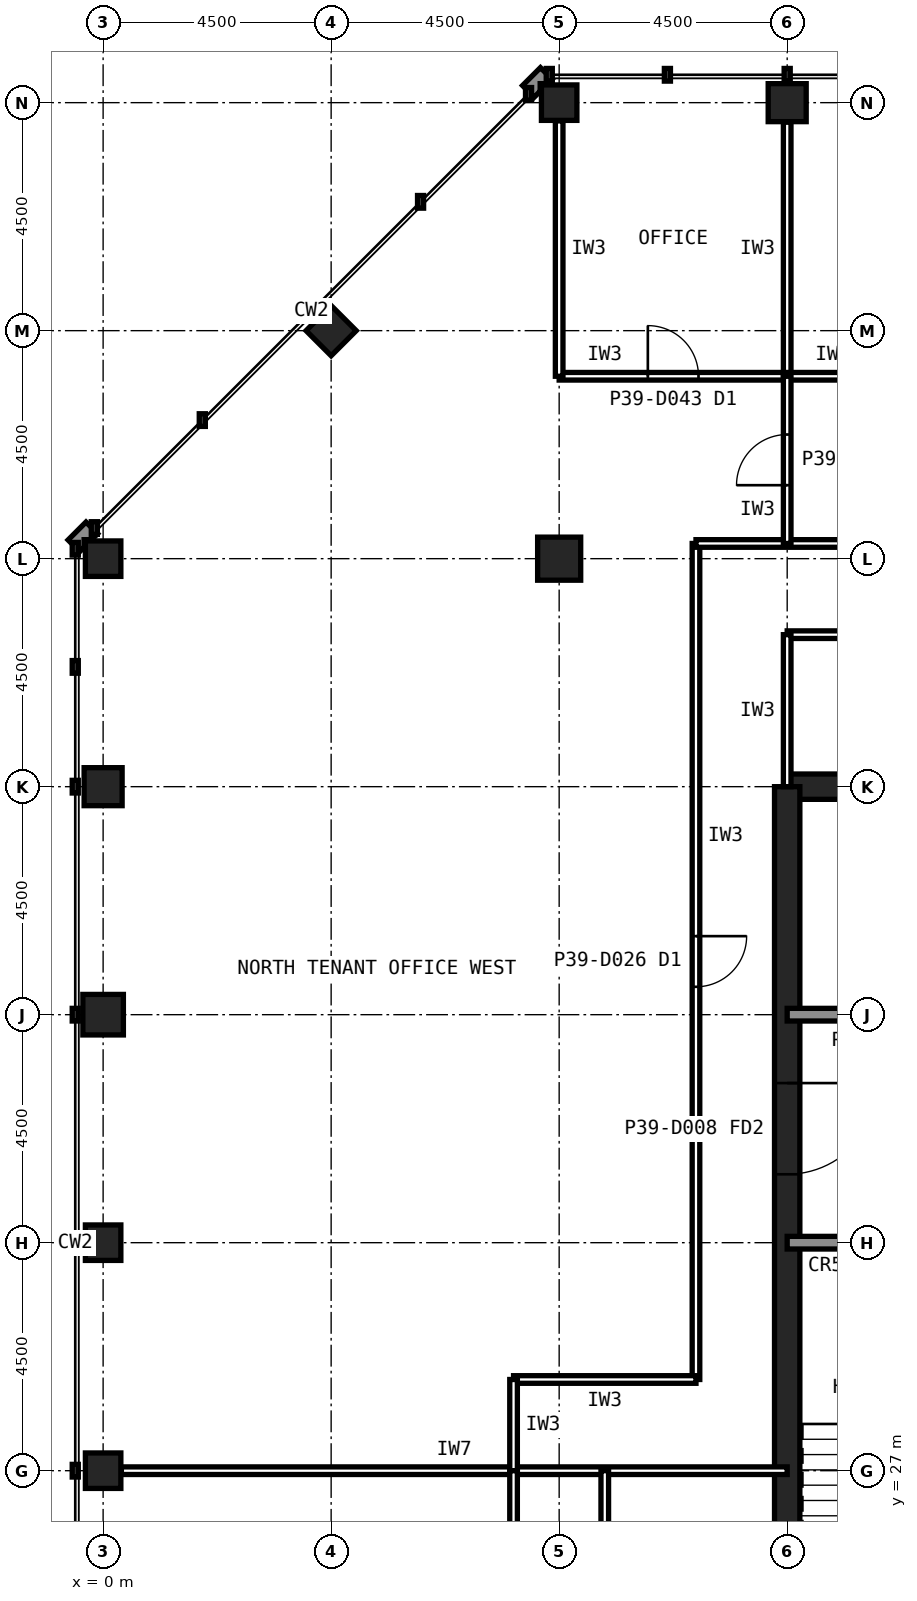
"""IFC4 building model, lengths in metres.
Left out: names, types, materials, properties, quantities, classifications, styles, units other than length and angle.
Written with IfcOpenShell. Run it as: python <this file> out.ifc"""

import sys

from ifc_helpers import new_model, si_unit, direction, frame, frame_2d, origin, origin_2d, place, context, subcontext, project, spatial, rectangle, hollow_rectangle, extrude, element, fill, save


model = new_model("IFC4")
c1 = context("Model", 3, precision=1e-05, world=origin(), true_north=direction((0.0, 1.0)))
c2 = subcontext(c1, "Body", "Model", "MODEL_VIEW")
j1 = project(units=[si_unit("LENGTHUNIT", "METRE"), si_unit("PLANEANGLEUNIT", "RADIAN")], contexts=[c1])
p1 = place(None, origin())
s1 = spatial("IfcSite", under=j1, at=p1, CompositionType="ELEMENT")
p2 = place(p1, origin())
s2 = spatial("IfcBuilding", under=s1, at=p2, CompositionType="ELEMENT")
p3 = place(p2, frame((0.0, 0.0, 167.6)))
s3 = spatial("IfcBuildingStorey", under=s2, at=p3, CompositionType="ELEMENT", Elevation=167.6)
p4 = place(p3, frame((13.5, 54.0, 0.0), z_axis=(0.0, 0.0, 1.0), x_axis=(1.0, 0.0, 0.0)))
e1 = element("IfcColumn", 1, at=p4, inside=s3, PredefinedType="COLUMN", context=c2, shape_type="SweptSolid", body=[
    extrude(hollow_rectangle(XDim=0.75, YDim=0.75, WallThickness=0.04, at=origin_2d()), origin(), (0.0, 0.0, 1.0), 4.0),
])
for number, where, z_axis, x_axis in (
    (2, (9.0, 54.0, 0.0), (0.0, 0.0, 1.0), (1.0, 0.0, 0.0)),
    (3, (0.0, 45.0, 0.0), (0.0, 0.0, 1.0), (1.0, 0.0, 0.0)),
):
    element("IfcColumn", number, at=place(p3, frame(where, z_axis=z_axis, x_axis=x_axis)), inside=s3, PredefinedType="COLUMN", context=c2, shape_type="SweptSolid", body=[
        extrude(hollow_rectangle(XDim=0.7, YDim=0.7, WallThickness=0.036, at=origin_2d()), origin(), (0.0, 0.0, 1.0), 4.0),
    ])
p5 = place(p3, frame((0.0, 40.5, 0.0), z_axis=(0.0, 0.0, 1.0), x_axis=(1.0, 0.0, 0.0)))
e4 = element("IfcColumn", 4, at=p5, inside=s3, PredefinedType="COLUMN", context=c2, shape_type="SweptSolid", body=[
    extrude(hollow_rectangle(XDim=0.75, YDim=0.75, WallThickness=0.04, at=origin_2d()), origin(), (0.0, 0.0, 1.0), 4.0),
])
p6 = place(p3, frame((0.0, 36.0, 0.0), z_axis=(0.0, 0.0, 1.0), x_axis=(1.0, 0.0, 0.0)))
e5 = element("IfcColumn", 5, at=p6, inside=s3, PredefinedType="COLUMN", context=c2, shape_type="SweptSolid", body=[
    extrude(hollow_rectangle(XDim=0.8, YDim=0.8, WallThickness=0.045, at=origin_2d()), origin(), (0.0, 0.0, 1.0), 4.0),
])
for number, where, z_axis, x_axis in (
    (6, (0.0, 31.5, 0.0), (0.0, 0.0, 1.0), (1.0, 0.0, 0.0)),
    (7, (0.0, 27.0, 0.0), (0.0, 0.0, 1.0), (1.0, 0.0, 0.0)),
    (8, (4.5, 49.5, 0.0), (0.0, 0.0, 1.0), (0.707, 0.707, 0.0)),
):
    element("IfcColumn", number, at=place(p3, frame(where, z_axis=z_axis, x_axis=x_axis)), inside=s3, PredefinedType="COLUMN", context=c2, shape_type="SweptSolid", body=[
        extrude(hollow_rectangle(XDim=0.7, YDim=0.7, WallThickness=0.036, at=origin_2d()), origin(), (0.0, 0.0, 1.0), 4.0),
    ])
p7 = place(p3, frame((9.0, 45.0, 0.0), z_axis=(0.0, 0.0, 1.0), x_axis=(1.0, 0.0, 0.0)))
e9 = element("IfcColumn", 9, at=p7, inside=s3, PredefinedType="COLUMN", context=c2, shape_type="SweptSolid", body=[
    extrude(hollow_rectangle(XDim=0.85, YDim=0.85, WallThickness=0.05, at=origin_2d()), origin(), (0.0, 0.0, 1.0), 4.0),
])
p8 = place(p3, frame((40.5, 40.5, 0.0), z_axis=(0.0, 0.0, 1.0), x_axis=(-1.0, 0.0, 0.0)))
e10 = element("IfcWall", 10, at=p8, inside=s3, PredefinedType="SHEAR", context=c2, shape_type="SweptSolid", body=[
    extrude(rectangle(XDim=27.0, YDim=0.5, at=frame_2d((13.5, 0.0))), origin(), (0.0, 0.0, 1.0), 4.0),
])
p9 = place(p3, frame((13.5, 40.5, 0.0), z_axis=(0.0, 0.0, 1.0), x_axis=(0.0, -1.0, 0.0)))
e11 = element("IfcWall", 11, at=p9, inside=s3, PredefinedType="SHEAR", context=c2, shape_type="SweptSolid", body=[
    extrude(rectangle(XDim=27.0, YDim=0.5, at=frame_2d((13.5, 0.0))), origin(), (0.0, 0.0, 1.0), 4.0),
])
p10 = place(p9, frame((19.65, 0.0, 0.0)))
e12 = element("IfcOpeningElement", 12, at=p10, cuts=e11, PredefinedType="OPENING", context=c2, shape_type="SweptSolid", body=[
    extrude(rectangle(XDim=1.2, YDim=2.1, at=frame_2d((0.6, 1.05))), frame((0.0, 0.26, 0.0), z_axis=(0.0, -1.0, 0.0), x_axis=(1.0, 0.0, 0.0)), (0.0, 0.0, 1.0), 0.52),
])
p11 = place(p9, frame((5.85, 0.0, 0.0)))
e13 = element("IfcOpeningElement", 13, at=p11, cuts=e11, PredefinedType="OPENING", context=c2, shape_type="SweptSolid", body=[
    extrude(rectangle(XDim=1.8, YDim=2.1, at=frame_2d((0.9, 1.05))), frame((0.0, 0.26, 0.0), z_axis=(0.0, -1.0, 0.0), x_axis=(1.0, 0.0, 0.0)), (0.0, 0.0, 1.0), 0.52),
])
p12 = place(p3, frame((13.5, 36.0, 0.0), z_axis=(0.0, 0.0, 1.0), x_axis=(1.0, 0.0, 0.0)))
e14 = element("IfcWall", 14, at=p12, inside=s3, PredefinedType="SOLIDWALL", context=c2, shape_type="SweptSolid", body=[
    extrude(rectangle(XDim=27.0, YDim=0.25, at=frame_2d((13.5, 0.0))), origin(), (0.0, 0.0, 1.0), 3.84),
])
p13 = place(p12, frame((1.8, 0.0, 0.0)))
e15 = element("IfcOpeningElement", 15, at=p13, cuts=e14, PredefinedType="OPENING", context=c2, shape_type="SweptSolid", body=[
    extrude(rectangle(XDim=0.9, YDim=2.1, at=frame_2d((0.45, 1.05))), frame((0.0, 0.135, 0.0), z_axis=(0.0, -1.0, 0.0), x_axis=(1.0, 0.0, 0.0)), (0.0, 0.0, 1.0), 0.27),
])
p14 = place(p12, frame((5.55, 0.0, 0.0)))
e16 = element("IfcOpeningElement", 16, at=p14, cuts=e14, PredefinedType="OPENING", context=c2, shape_type="SweptSolid", body=[
    extrude(rectangle(XDim=0.9, YDim=2.1, at=frame_2d((0.45, 1.05))), frame((0.0, 0.135, 0.0), z_axis=(0.0, -1.0, 0.0), x_axis=(1.0, 0.0, 0.0)), (0.0, 0.0, 1.0), 0.27),
])
p15 = place(p12, frame((8.55, 0.0, 0.0)))
e17 = element("IfcOpeningElement", 17, at=p15, cuts=e14, PredefinedType="OPENING", context=c2, shape_type="SweptSolid", body=[
    extrude(rectangle(XDim=0.9, YDim=2.1, at=frame_2d((0.45, 1.05))), frame((0.0, 0.135, 0.0), z_axis=(0.0, -1.0, 0.0), x_axis=(1.0, 0.0, 0.0)), (0.0, 0.0, 1.0), 0.27),
])
p16 = place(p12, frame((24.1, 0.0, 0.0)))
e18 = element("IfcOpeningElement", 18, at=p16, cuts=e14, PredefinedType="OPENING", context=c2, shape_type="SweptSolid", body=[
    extrude(rectangle(XDim=1.3, YDim=2.2, at=frame_2d((0.65, 1.1))), frame((0.0, 0.135, 0.0), z_axis=(0.0, -1.0, 0.0), x_axis=(1.0, 0.0, 0.0)), (0.0, 0.0, 1.0), 0.27),
])
p17 = place(p3, frame((13.5, 31.5, 0.0), z_axis=(0.0, 0.0, 1.0), x_axis=(1.0, 0.0, 0.0)))
e19 = element("IfcWall", 19, at=p17, inside=s3, PredefinedType="SOLIDWALL", context=c2, shape_type="SweptSolid", body=[
    extrude(rectangle(XDim=27.0, YDim=0.25, at=frame_2d((13.5, 0.0))), origin(), (0.0, 0.0, 1.0), 3.84),
])
p18 = place(p17, frame((24.15, 0.0, 0.0)))
e20 = element("IfcOpeningElement", 20, at=p18, cuts=e19, PredefinedType="OPENING", context=c2, shape_type="SweptSolid", body=[
    extrude(rectangle(XDim=1.2, YDim=2.1, at=frame_2d((0.6, 1.05))), frame((0.0, 0.135, 0.0), z_axis=(0.0, -1.0, 0.0), x_axis=(1.0, 0.0, 0.0)), (0.0, 0.0, 1.0), 0.27),
])
p19 = place(p17, frame((15.3, 0.0, 0.0)))
e21 = element("IfcOpeningElement", 21, at=p19, cuts=e19, PredefinedType="OPENING", context=c2, shape_type="SweptSolid", body=[
    extrude(rectangle(XDim=0.9, YDim=2.1, at=frame_2d((0.45, 1.05))), frame((0.0, 0.135, 0.0), z_axis=(0.0, -1.0, 0.0), x_axis=(1.0, 0.0, 0.0)), (0.0, 0.0, 1.0), 0.27),
])
p20 = place(p17, frame((19.8, 0.0, 0.0)))
e22 = element("IfcOpeningElement", 22, at=p20, cuts=e19, PredefinedType="OPENING", context=c2, shape_type="SweptSolid", body=[
    extrude(rectangle(XDim=0.9, YDim=2.1, at=frame_2d((0.45, 1.05))), frame((0.0, 0.135, 0.0), z_axis=(0.0, -1.0, 0.0), x_axis=(1.0, 0.0, 0.0)), (0.0, 0.0, 1.0), 0.27),
])
p21 = place(p3, frame((0.36, 27.0, 0.0), z_axis=(0.0, 0.0, 1.0), x_axis=(1.0, 0.0, 0.0)))
e23 = element("IfcWall", 23, at=p21, inside=s3, PredefinedType="PARTITIONING", context=c2, shape_type="SweptSolid", body=[
    extrude(rectangle(XDim=13.14, YDim=0.15, at=frame_2d((6.57, 0.0))), origin(), (0.0, 0.0, 1.0), 2.989),
])
p22 = place(p3, frame((11.7, 45.3, 0.0), z_axis=(0.0, 0.0, 1.0), x_axis=(0.0, -1.0, 0.0)))
e24 = element("IfcWall", 24, at=p22, inside=s3, PredefinedType="PARTITIONING", context=c2, shape_type="SweptSolid", body=[
    extrude(rectangle(XDim=16.5, YDim=0.15, at=frame_2d((8.25, 0.0))), origin(), (0.0, 0.0, 1.0), 3.84),
])
p23 = place(p22, frame((7.75, 0.0, 0.0)))
e25 = element("IfcOpeningElement", 25, at=p23, cuts=e24, PredefinedType="OPENING", context=c2, shape_type="SweptSolid", body=[
    extrude(rectangle(XDim=1.0, YDim=2.1, at=frame_2d((0.5, 1.05))), frame((0.0, 0.085, 0.0), z_axis=(0.0, -1.0, 0.0), x_axis=(1.0, 0.0, 0.0)), (0.0, 0.0, 1.0), 0.17),
])
p24 = place(p3, frame((25.2, 45.3, 0.0), z_axis=(0.0, 0.0, 1.0), x_axis=(-1.0, 0.0, 0.0)))
e26 = element("IfcWall", 26, at=p24, inside=s3, PredefinedType="PARTITIONING", context=c2, shape_type="SweptSolid", body=[
    extrude(rectangle(XDim=13.5, YDim=0.15, at=frame_2d((6.75, 0.0))), origin(), (0.0, 0.0, 1.0), 3.84),
])
p25 = place(p24, frame((6.25, 0.0, 0.0)))
e27 = element("IfcOpeningElement", 27, at=p25, cuts=e26, PredefinedType="OPENING", context=c2, shape_type="SweptSolid", body=[
    extrude(rectangle(XDim=1.0, YDim=2.1, at=frame_2d((0.5, 1.05))), frame((0.0, 0.085, 0.0), z_axis=(0.0, -1.0, 0.0), x_axis=(1.0, 0.0, 0.0)), (0.0, 0.0, 1.0), 0.17),
])
p26 = place(p3, frame((11.7, 28.8, 0.0), z_axis=(0.0, 0.0, 1.0), x_axis=(-1.0, 0.0, 0.0)))
e28 = element("IfcWall", 28, at=p26, inside=s3, PredefinedType="PARTITIONING", context=c2, shape_type="SweptSolid", body=[
    extrude(rectangle(XDim=3.6, YDim=0.15, at=frame_2d((1.8, 0.0))), origin(), (0.0, 0.0, 1.0), 3.84),
])
p27 = place(p3, frame((8.1, 28.8, 0.0), z_axis=(0.0, 0.0, 1.0), x_axis=(0.0, -1.0, 0.0)))
e29 = element("IfcWall", 29, at=p27, inside=s3, PredefinedType="PARTITIONING", context=c2, shape_type="SweptSolid", body=[
    extrude(rectangle(XDim=1.8, YDim=0.15, at=frame_2d((0.9, 0.0))), origin(), (0.0, 0.0, 1.0), 3.84),
])
p28 = place(p3, frame((8.1, 27.0, 0.0), z_axis=(0.0, 0.0, 1.0), x_axis=(0.0, -1.0, 0.0)))
e30 = element("IfcWall", 30, at=p28, inside=s3, PredefinedType="PARTITIONING", context=c2, shape_type="SweptSolid", body=[
    extrude(rectangle(XDim=6.3, YDim=0.15, at=frame_2d((3.15, 0.0))), origin(), (0.0, 0.0, 1.0), 3.84),
])
p29 = place(p3, frame((9.0, 48.6, 0.0), z_axis=(0.0, 0.0, 1.0), x_axis=(1.0, 0.0, 0.0)))
e31 = element("IfcWall", 31, at=p29, inside=s3, PredefinedType="PARTITIONING", context=c2, shape_type="SweptSolid", body=[
    extrude(rectangle(XDim=4.5, YDim=0.15, at=frame_2d((2.25, 0.0))), origin(), (0.0, 0.0, 1.0), 3.84),
])
p30 = place(p29, frame((1.75, 0.0, 0.0)))
e32 = element("IfcOpeningElement", 32, at=p30, cuts=e31, PredefinedType="OPENING", context=c2, shape_type="SweptSolid", body=[
    extrude(rectangle(XDim=1.0, YDim=2.1, at=frame_2d((0.5, 1.05))), frame((0.0, 0.085, 0.0), z_axis=(0.0, -1.0, 0.0), x_axis=(1.0, 0.0, 0.0)), (0.0, 0.0, 1.0), 0.17),
])
p31 = place(p3, frame((13.5, 48.6, 0.0), z_axis=(0.0, 0.0, 1.0), x_axis=(0.0, 1.0, 0.0)))
e33 = element("IfcWall", 33, at=p31, inside=s3, PredefinedType="PARTITIONING", context=c2, shape_type="SweptSolid", body=[
    extrude(rectangle(XDim=5.015, YDim=0.15, at=frame_2d((2.507, 0.0))), origin(), (0.0, 0.0, 1.0), 2.989),
])
p32 = place(p3, frame((9.0, 53.64, 0.0), z_axis=(0.0, 0.0, 1.0), x_axis=(0.0, -1.0, 0.0)))
e34 = element("IfcWall", 34, at=p32, inside=s3, PredefinedType="PARTITIONING", context=c2, shape_type="SweptSolid", body=[
    extrude(rectangle(XDim=5.04, YDim=0.15, at=frame_2d((2.52, 0.0))), origin(), (0.0, 0.0, 1.0), 3.229),
])
p33 = place(p3, frame((13.5, 48.6, 0.0), z_axis=(0.0, 0.0, 1.0), x_axis=(1.0, 0.0, 0.0)))
e35 = element("IfcWall", 35, at=p33, inside=s3, PredefinedType="PARTITIONING", context=c2, shape_type="SweptSolid", body=[
    extrude(rectangle(XDim=4.5, YDim=0.15, at=frame_2d((2.25, 0.0))), origin(), (0.0, 0.0, 1.0), 3.84),
])
p34 = place(p33, frame((1.75, 0.0, 0.0)))
e36 = element("IfcOpeningElement", 36, at=p34, cuts=e35, PredefinedType="OPENING", context=c2, shape_type="SweptSolid", body=[
    extrude(rectangle(XDim=1.0, YDim=2.1, at=frame_2d((0.5, 1.05))), frame((0.0, 0.085, 0.0), z_axis=(0.0, -1.0, 0.0), x_axis=(1.0, 0.0, 0.0)), (0.0, 0.0, 1.0), 0.17),
])
p35 = place(p3, frame((9.9, 27.0, 0.0), z_axis=(0.0, 0.0, 1.0), x_axis=(0.0, -1.0, 0.0)))
e37 = element("IfcWall", 37, at=p35, inside=s3, PredefinedType="PARTITIONING", context=c2, shape_type="SweptSolid", body=[
    extrude(rectangle(XDim=4.5, YDim=0.15, at=frame_2d((2.25, 0.0))), origin(), (0.0, 0.0, 1.0), 3.84),
])
p36 = place(p3, frame((18.0, 43.5, 0.0), z_axis=(0.0, 0.0, 1.0), x_axis=(-1.0, 0.0, 0.0)))
e38 = element("IfcWall", 38, at=p36, inside=s3, PredefinedType="PARTITIONING", context=c2, shape_type="SweptSolid", body=[
    extrude(rectangle(XDim=4.5, YDim=0.15, at=frame_2d((2.25, 0.0))), origin(), (0.0, 0.0, 1.0), 3.84),
])
p37 = place(p36, frame((1.75, 0.0, 0.0)))
e39 = element("IfcOpeningElement", 39, at=p37, cuts=e38, PredefinedType="OPENING", context=c2, shape_type="SweptSolid", body=[
    extrude(rectangle(XDim=1.0, YDim=2.1, at=frame_2d((0.5, 1.05))), frame((0.0, 0.085, 0.0), z_axis=(0.0, -1.0, 0.0), x_axis=(1.0, 0.0, 0.0)), (0.0, 0.0, 1.0), 0.17),
])
p38 = place(p3, frame((13.5, 43.5, 0.0), z_axis=(0.0, 0.0, 1.0), x_axis=(0.0, -1.0, 0.0)))
e40 = element("IfcWall", 40, at=p38, inside=s3, PredefinedType="PARTITIONING", context=c2, shape_type="SweptSolid", body=[
    extrude(rectangle(XDim=3.0, YDim=0.15, at=frame_2d((1.5, 0.0))), origin(), (0.0, 0.0, 1.0), 2.989),
])
p39 = place(p3, frame((13.5, 45.3, 0.0), z_axis=(0.0, 0.0, 1.0), x_axis=(0.0, 1.0, 0.0)))
e41 = element("IfcWall", 41, at=p39, inside=s3, PredefinedType="PARTITIONING", context=c2, shape_type="SweptSolid", body=[
    extrude(rectangle(XDim=3.3, YDim=0.15, at=frame_2d((1.65, 0.0))), origin(), (0.0, 0.0, 1.0), 2.989),
])
p40 = place(p39, frame((1.15, 0.0, 0.0)))
e42 = element("IfcOpeningElement", 42, at=p40, cuts=e41, PredefinedType="OPENING", context=c2, shape_type="SweptSolid", body=[
    extrude(rectangle(XDim=1.0, YDim=2.1, at=frame_2d((0.5, 1.05))), frame((0.0, 0.085, 0.0), z_axis=(0.0, -1.0, 0.0), x_axis=(1.0, 0.0, 0.0)), (0.0, 0.0, 1.0), 0.17),
])
p41 = place(p11, origin())
e43 = element("IfcDoor", 43, at=p41, inside=s3, OperationType="SINGLE_SWING_LEFT", PredefinedType="DOOR", context=c2, shape_type="SweptSolid", body=[
    extrude(rectangle(XDim=1.8, YDim=2.1, at=frame_2d((0.9, 1.05))), frame((0.0, 0.025, 0.0), z_axis=(0.0, -1.0, 0.0), x_axis=(1.0, 0.0, 0.0)), (0.0, 0.0, 1.0), 0.05),
])
fill(e13, e43)
p42 = place(p23, origin())
e44 = element("IfcDoor", 44, at=p42, inside=s3, OperationType="SINGLE_SWING_LEFT", PredefinedType="DOOR", context=c2, shape_type="SweptSolid", body=[
    extrude(rectangle(XDim=1.0, YDim=2.1, at=frame_2d((0.5, 1.05))), frame((0.0, 0.025, 0.0), z_axis=(0.0, -1.0, 0.0), x_axis=(1.0, 0.0, 0.0)), (0.0, 0.0, 1.0), 0.05),
])
fill(e25, e44)
p43 = place(p30, origin())
e45 = element("IfcDoor", 45, at=p43, inside=s3, OperationType="SINGLE_SWING_LEFT", PredefinedType="DOOR", context=c2, shape_type="SweptSolid", body=[
    extrude(rectangle(XDim=1.0, YDim=2.1, at=frame_2d((0.5, 1.05))), frame((0.0, 0.025, 0.0), z_axis=(0.0, -1.0, 0.0), x_axis=(1.0, 0.0, 0.0)), (0.0, 0.0, 1.0), 0.05),
])
fill(e32, e45)
p44 = place(p40, origin())
e46 = element("IfcDoor", 46, at=p44, inside=s3, OperationType="SINGLE_SWING_LEFT", PredefinedType="DOOR", context=c2, shape_type="SweptSolid", body=[
    extrude(rectangle(XDim=1.0, YDim=2.1, at=frame_2d((0.5, 1.05))), frame((0.0, 0.025, 0.0), z_axis=(0.0, -1.0, 0.0), x_axis=(1.0, 0.0, 0.0)), (0.0, 0.0, 1.0), 0.05),
])
fill(e42, e46)
save(model, sys.argv[1])
